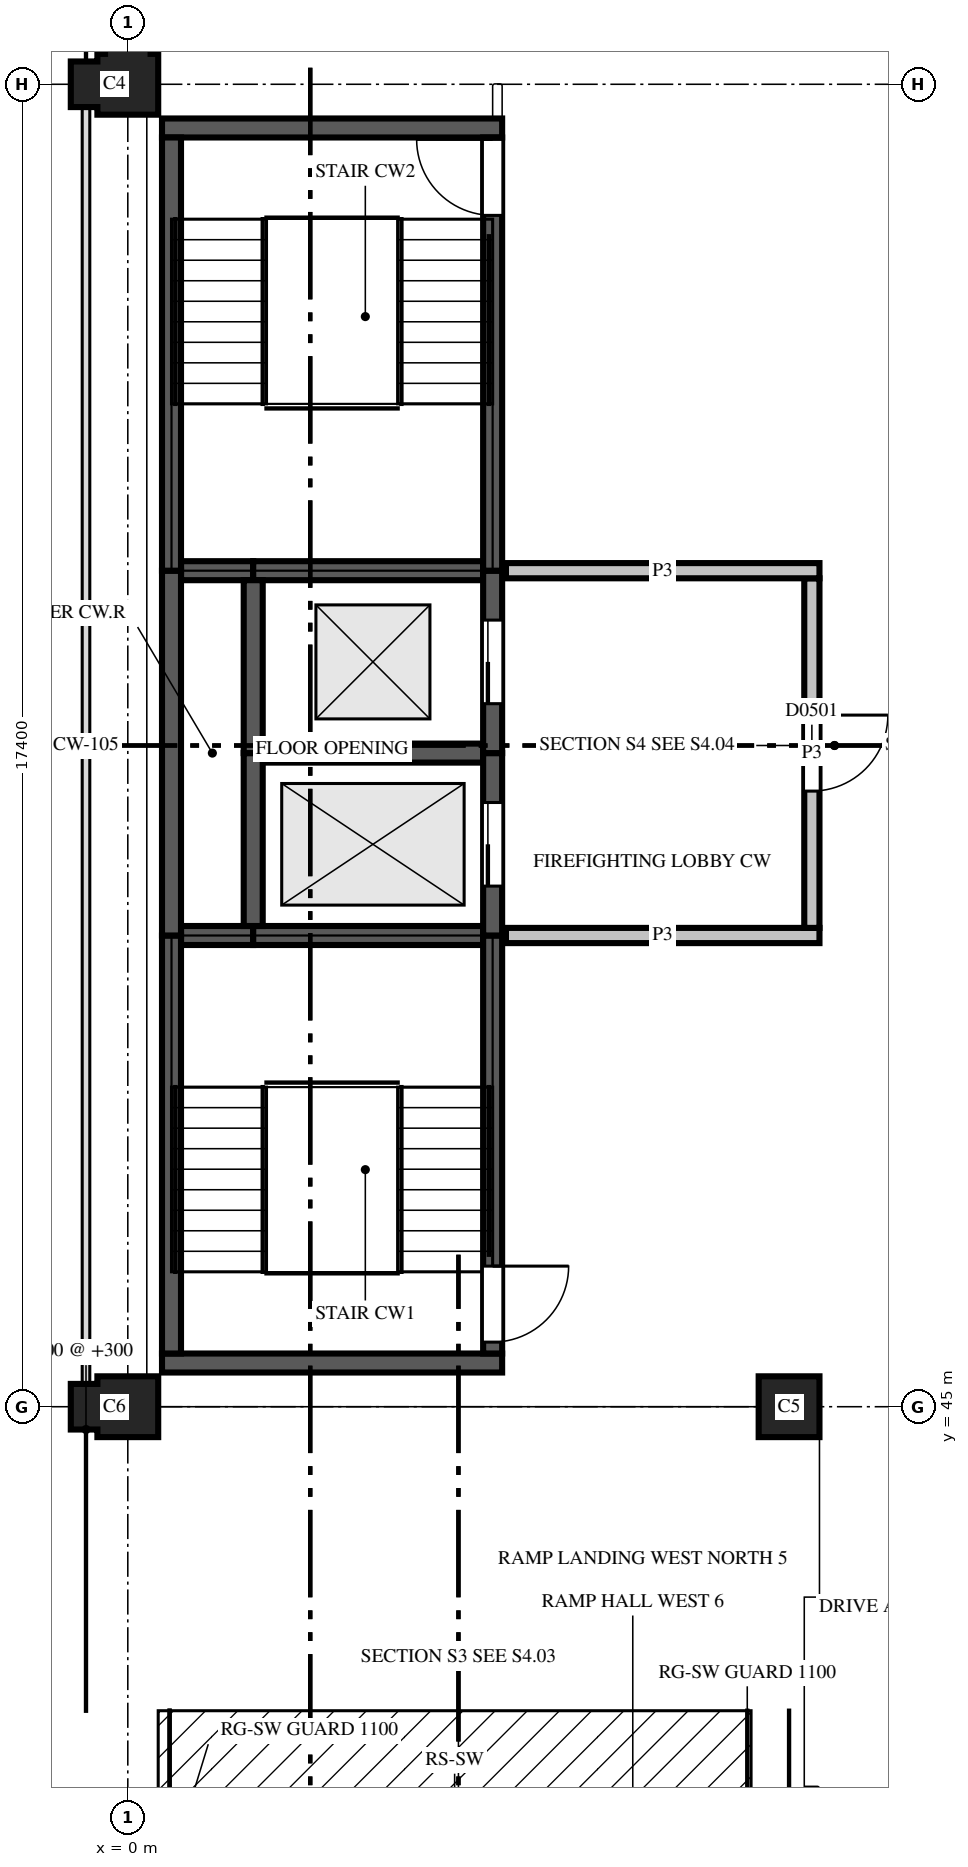
"""IFC4 building model, lengths in metres.
Left out: names, types, materials, properties, quantities, classifications, styles, units other than length and angle.
Written with IfcOpenShell. Run it as: python <this file> out.ifc"""

import sys

from ifc_helpers import new_model, si_unit, direction, frame, frame_2d, origin, place, context, subcontext, project, spatial, polyline, rectangle, outline, extrude, element, fill, save


model = new_model("IFC4")
c1 = context("Model", 3, precision=1e-05, world=origin(), true_north=direction((0.0, 1.0)))
c2 = subcontext(c1, "Body", "Model", "MODEL_VIEW")
j1 = project(units=[si_unit("LENGTHUNIT", "METRE"), si_unit("PLANEANGLEUNIT", "RADIAN")], contexts=[c1])
p1 = place(None, origin())
s1 = spatial("IfcSite", under=j1, at=p1, CompositionType="ELEMENT")
p2 = place(p1, origin())
s2 = spatial("IfcBuilding", under=s1, at=p2, CompositionType="ELEMENT")
p3 = place(p2, frame((0.0, 0.0, 19.3)))
s3 = spatial("IfcBuildingStorey", under=s2, at=p3, CompositionType="ELEMENT", Elevation=19.3)
p4 = place(p3, frame((0.0, 45.0, 0.0), z_axis=(0.0, 0.0, 1.0), x_axis=(-1.0, 0.0, 0.0)))
e1 = element("IfcColumn", 1, at=p4, inside=s3, PredefinedType="COLUMN", context=c2, shape_type="SweptSolid", body=[
    extrude(outline(polyline([(-0.4, -0.4), (0.4, -0.4), (0.4, -0.3), (0.75, -0.3), (0.75, 0.3), (0.4, 0.3), (0.4, 0.4), (-0.4, 0.4), (-0.4, -0.4)])), origin(), (0.0, 0.0, 1.0), 3.7),
])
p5 = place(p3, frame((8.7, 45.0, 0.0), z_axis=(0.0, 0.0, 1.0), x_axis=(1.0, 0.0, 0.0)))
e2 = element("IfcColumn", 2, at=p5, inside=s3, PredefinedType="COLUMN", context=c2, shape_type="SweptSolid", body=[
    extrude(outline(polyline([(-0.4, -0.4), (0.4, -0.4), (0.4, 0.4), (-0.4, 0.4), (-0.4, -0.4)])), origin(), (0.0, 0.0, 1.0), 3.7),
])
p6 = place(p3, frame((0.0, 62.4, 0.0), z_axis=(0.0, 0.0, 1.0), x_axis=(0.0, 1.0, 0.0)))
e3 = element("IfcColumn", 3, at=p6, inside=s3, PredefinedType="COLUMN", context=c2, shape_type="SweptSolid", body=[
    extrude(outline(polyline([(-0.4, -0.4), (0.4, -0.4), (0.4, -0.3), (0.75, -0.3), (0.75, 0.3), (0.4, 0.3), (0.4, 0.4), (0.3, 0.4), (0.3, 0.75), (-0.3, 0.75), (-0.3, 0.4), (-0.4, 0.4), (-0.4, -0.4)])), origin(), (0.0, 0.0, 1.0), 3.7),
])
p7 = place(p3, frame((0.45, 45.575, 0.0), z_axis=(0.0, 0.0, 1.0), x_axis=(1.0, 0.0, 0.0)))
e4 = element("IfcWall", 4, at=p7, inside=s3, PredefinedType="SHEAR", context=c2, shape_type="SweptSolid", body=[
    extrude(rectangle(XDim=4.475, YDim=0.25, at=frame_2d((2.238, 0.0))), origin(), (0.0, 0.0, 1.0), 3.7),
])
p8 = place(p3, frame((0.7, 51.2, 0.0), z_axis=(0.0, 0.0, 1.0), x_axis=(1.0, 0.0, 0.0)))
e5 = element("IfcWall", 5, at=p8, inside=s3, PredefinedType="SHEAR", context=c2, shape_type="SweptSolid", body=[
    extrude(rectangle(XDim=0.95, YDim=0.25, at=frame_2d((0.475, 0.0))), origin(), (0.0, 0.0, 1.0), 3.7),
])
p9 = place(p3, frame((1.65, 51.2, 0.0), z_axis=(0.0, 0.0, 1.0), x_axis=(1.0, 0.0, 0.0)))
e6 = element("IfcWall", 6, at=p9, inside=s3, PredefinedType="SHEAR", context=c2, shape_type="SweptSolid", body=[
    extrude(rectangle(XDim=3.025, YDim=0.25, at=frame_2d((1.513, 0.0))), origin(), (0.0, 0.0, 1.0), 3.7),
])
p10 = place(p3, frame((1.775, 53.6, 0.0), z_axis=(0.0, 0.0, 1.0), x_axis=(1.0, 0.0, 0.0)))
e7 = element("IfcWall", 7, at=p10, inside=s3, PredefinedType="SHEAR", context=c2, shape_type="SweptSolid", body=[
    extrude(rectangle(XDim=2.9, YDim=0.25, at=frame_2d((1.45, 0.0))), origin(), (0.0, 0.0, 1.0), 3.7),
])
p11 = place(p3, frame((0.7, 56.0, 0.0), z_axis=(0.0, 0.0, 1.0), x_axis=(1.0, 0.0, 0.0)))
e8 = element("IfcWall", 8, at=p11, inside=s3, PredefinedType="SHEAR", context=c2, shape_type="SweptSolid", body=[
    extrude(rectangle(XDim=0.95, YDim=0.25, at=frame_2d((0.475, 0.0))), origin(), (0.0, 0.0, 1.0), 3.7),
])
p12 = place(p3, frame((1.65, 56.0, 0.0), z_axis=(0.0, 0.0, 1.0), x_axis=(1.0, 0.0, 0.0)))
e9 = element("IfcWall", 9, at=p12, inside=s3, PredefinedType="SHEAR", context=c2, shape_type="SweptSolid", body=[
    extrude(rectangle(XDim=3.025, YDim=0.25, at=frame_2d((1.513, 0.0))), origin(), (0.0, 0.0, 1.0), 3.7),
])
p13 = place(p3, frame((0.45, 61.825, 0.0), z_axis=(0.0, 0.0, 1.0), x_axis=(1.0, 0.0, 0.0)))
e10 = element("IfcWall", 10, at=p13, inside=s3, PredefinedType="SHEAR", context=c2, shape_type="SweptSolid", body=[
    extrude(rectangle(XDim=4.475, YDim=0.25, at=frame_2d((2.238, 0.0))), origin(), (0.0, 0.0, 1.0), 3.7),
])
p14 = place(p3, frame((0.575, 45.7, 0.0), z_axis=(0.0, 0.0, 1.0), x_axis=(0.0, 1.0, 0.0)))
e11 = element("IfcWall", 11, at=p14, inside=s3, PredefinedType="SHEAR", context=c2, shape_type="SweptSolid", body=[
    extrude(rectangle(XDim=5.5, YDim=0.25, at=frame_2d((2.75, 0.0))), origin(), (0.0, 0.0, 1.0), 3.7),
])
p15 = place(p3, frame((0.575, 51.2, 0.0), z_axis=(0.0, 0.0, 1.0), x_axis=(0.0, 1.0, 0.0)))
e12 = element("IfcWall", 12, at=p15, inside=s3, PredefinedType="SHEAR", context=c2, shape_type="SweptSolid", body=[
    extrude(rectangle(XDim=4.8, YDim=0.25, at=frame_2d((2.4, 0.0))), origin(), (0.0, 0.0, 1.0), 3.7),
])
p16 = place(p3, frame((0.575, 56.0, 0.0), z_axis=(0.0, 0.0, 1.0), x_axis=(0.0, 1.0, 0.0)))
e13 = element("IfcWall", 13, at=p16, inside=s3, PredefinedType="SHEAR", context=c2, shape_type="SweptSolid", body=[
    extrude(rectangle(XDim=5.7, YDim=0.25, at=frame_2d((2.85, 0.0))), origin(), (0.0, 0.0, 1.0), 3.7),
])
p17 = place(p3, frame((1.65, 51.325, 0.0), z_axis=(0.0, 0.0, 1.0), x_axis=(0.0, 1.0, 0.0)))
e14 = element("IfcWall", 14, at=p17, inside=s3, PredefinedType="SHEAR", context=c2, shape_type="SweptSolid", body=[
    extrude(rectangle(XDim=2.275, YDim=0.25, at=frame_2d((1.138, 0.0))), origin(), (0.0, 0.0, 1.0), 3.7),
])
p18 = place(p3, frame((1.65, 53.6, 0.0), z_axis=(0.0, 0.0, 1.0), x_axis=(0.0, 1.0, 0.0)))
e15 = element("IfcWall", 15, at=p18, inside=s3, PredefinedType="SHEAR", context=c2, shape_type="SweptSolid", body=[
    extrude(rectangle(XDim=2.275, YDim=0.25, at=frame_2d((1.137, 0.0))), origin(), (0.0, 0.0, 1.0), 3.7),
])
p19 = place(p3, frame((4.8, 45.7, 0.0), z_axis=(0.0, 0.0, 1.0), x_axis=(0.0, 1.0, 0.0)))
e16 = element("IfcWall", 16, at=p19, inside=s3, PredefinedType="SHEAR", context=c2, shape_type="SweptSolid", body=[
    extrude(rectangle(XDim=5.5, YDim=0.25, at=frame_2d((2.75, 0.0))), origin(), (0.0, 0.0, 1.0), 3.7),
])
p20 = place(p19, frame((0.15, 0.0, 0.0)))
e17 = element("IfcOpeningElement", 17, at=p20, cuts=e16, PredefinedType="OPENING", context=c2, shape_type="SweptSolid", body=[
    extrude(rectangle(XDim=1.0, YDim=2.1, at=frame_2d((0.5, 1.05))), frame((0.0, 0.135, 0.0), z_axis=(0.0, -1.0, 0.0), x_axis=(1.0, 0.0, 0.0)), (0.0, 0.0, 1.0), 0.27),
])
p21 = place(p3, frame((4.8, 51.2, 0.0), z_axis=(0.0, 0.0, 1.0), x_axis=(0.0, 1.0, 0.0)))
e18 = element("IfcWall", 18, at=p21, inside=s3, PredefinedType="SHEAR", context=c2, shape_type="SweptSolid", body=[
    extrude(rectangle(XDim=2.4, YDim=0.25, at=frame_2d((1.2, 0.0))), origin(), (0.0, 0.0, 1.0), 3.7),
])
p22 = place(p21, frame((0.65, 0.0, 0.0)))
e19 = element("IfcOpeningElement", 19, at=p22, cuts=e18, PredefinedType="OPENING", context=c2, shape_type="SweptSolid", body=[
    extrude(rectangle(XDim=1.1, YDim=2.1, at=frame_2d((0.55, 1.05))), frame((0.0, 0.135, 0.0), z_axis=(0.0, -1.0, 0.0), x_axis=(1.0, 0.0, 0.0)), (0.0, 0.0, 1.0), 0.27),
])
p23 = place(p3, frame((4.8, 53.6, 0.0), z_axis=(0.0, 0.0, 1.0), x_axis=(0.0, 1.0, 0.0)))
e20 = element("IfcWall", 20, at=p23, inside=s3, PredefinedType="SHEAR", context=c2, shape_type="SweptSolid", body=[
    extrude(rectangle(XDim=2.4, YDim=0.25, at=frame_2d((1.2, 0.0))), origin(), (0.0, 0.0, 1.0), 3.7),
])
p24 = place(p23, frame((0.65, 0.0, 0.0)))
e21 = element("IfcOpeningElement", 21, at=p24, cuts=e20, PredefinedType="OPENING", context=c2, shape_type="SweptSolid", body=[
    extrude(rectangle(XDim=1.1, YDim=2.1, at=frame_2d((0.55, 1.05))), frame((0.0, 0.135, 0.0), z_axis=(0.0, -1.0, 0.0), x_axis=(1.0, 0.0, 0.0)), (0.0, 0.0, 1.0), 0.27),
])
p25 = place(p3, frame((4.8, 56.0, 0.0), z_axis=(0.0, 0.0, 1.0), x_axis=(0.0, 1.0, 0.0)))
e22 = element("IfcWall", 22, at=p25, inside=s3, PredefinedType="SHEAR", context=c2, shape_type="SweptSolid", body=[
    extrude(rectangle(XDim=5.7, YDim=0.25, at=frame_2d((2.85, 0.0))), origin(), (0.0, 0.0, 1.0), 3.7),
])
p26 = place(p25, frame((4.675, 0.0, 0.0)))
e23 = element("IfcOpeningElement", 23, at=p26, cuts=e22, PredefinedType="OPENING", context=c2, shape_type="SweptSolid", body=[
    extrude(rectangle(XDim=1.0, YDim=2.1, at=frame_2d((0.5, 1.05))), frame((0.0, 0.135, 0.0), z_axis=(0.0, -1.0, 0.0), x_axis=(1.0, 0.0, 0.0)), (0.0, 0.0, 1.0), 0.27),
])
p27 = place(p3, frame((4.975, 51.2, 0.0), z_axis=(0.0, 0.0, 1.0), x_axis=(1.0, 0.0, 0.0)))
e24 = element("IfcWall", 24, at=p27, inside=s3, PredefinedType="PARTITIONING", context=c2, shape_type="SweptSolid", body=[
    extrude(rectangle(XDim=4.125, YDim=0.2, at=frame_2d((2.062, 0.0))), origin(), (0.0, 0.0, 1.0), 2.88),
])
p28 = place(p3, frame((9.0, 51.3, 0.0), z_axis=(0.0, 0.0, 1.0), x_axis=(0.0, 1.0, 0.0)))
e25 = element("IfcWall", 25, at=p28, inside=s3, PredefinedType="PARTITIONING", context=c2, shape_type="SweptSolid", body=[
    extrude(rectangle(XDim=4.6, YDim=0.2, at=frame_2d((2.3, 0.0))), origin(), (0.0, 0.0, 1.0), 2.88),
])
p29 = place(p28, frame((1.8, 0.0, 0.0)))
e26 = element("IfcOpeningElement", 26, at=p29, cuts=e25, PredefinedType="OPENING", context=c2, shape_type="SweptSolid", body=[
    extrude(rectangle(XDim=1.0, YDim=2.1, at=frame_2d((0.5, 1.05))), frame((0.0, 0.11, 0.0), z_axis=(0.0, -1.0, 0.0), x_axis=(1.0, 0.0, 0.0)), (0.0, 0.0, 1.0), 0.22),
])
p30 = place(p3, frame((9.1, 56.0, 0.0), z_axis=(0.0, 0.0, 1.0), x_axis=(-1.0, 0.0, 0.0)))
e27 = element("IfcWall", 27, at=p30, inside=s3, PredefinedType="PARTITIONING", context=c2, shape_type="SweptSolid", body=[
    extrude(rectangle(XDim=4.125, YDim=0.2, at=frame_2d((2.062, 0.0))), origin(), (0.0, 0.0, 1.0), 2.88),
])
p31 = place(p29, origin())
e28 = element("IfcDoor", 28, at=p31, inside=s3, OperationType="SINGLE_SWING_RIGHT", PredefinedType="DOOR", context=c2, shape_type="SweptSolid", body=[
    extrude(rectangle(XDim=1.0, YDim=2.1, at=frame_2d((0.5, 1.05))), frame((0.0, 0.025, 0.0), z_axis=(0.0, -1.0, 0.0), x_axis=(1.0, 0.0, 0.0)), (0.0, 0.0, 1.0), 0.05),
])
fill(e26, e28)
p32 = place(p22, origin())
e29 = element("IfcDoor", 29, at=p32, inside=s3, OperationType="SLIDING_TO_LEFT", PredefinedType="DOOR", context=c2, shape_type="SweptSolid", body=[
    extrude(rectangle(XDim=1.1, YDim=2.1, at=frame_2d((0.55, 1.05))), frame((0.0, 0.025, 0.0), z_axis=(0.0, -1.0, 0.0), x_axis=(1.0, 0.0, 0.0)), (0.0, 0.0, 1.0), 0.05),
])
fill(e19, e29)
p33 = place(p24, origin())
e30 = element("IfcDoor", 30, at=p33, inside=s3, OperationType="SLIDING_TO_LEFT", PredefinedType="DOOR", context=c2, shape_type="SweptSolid", body=[
    extrude(rectangle(XDim=1.1, YDim=2.1, at=frame_2d((0.55, 1.05))), frame((0.0, 0.025, 0.0), z_axis=(0.0, -1.0, 0.0), x_axis=(1.0, 0.0, 0.0)), (0.0, 0.0, 1.0), 0.05),
])
fill(e21, e30)
p34 = place(p26, origin())
e31 = element("IfcDoor", 31, at=p34, inside=s3, OperationType="SINGLE_SWING_LEFT", PredefinedType="DOOR", context=c2, shape_type="SweptSolid", body=[
    extrude(rectangle(XDim=1.0, YDim=2.1, at=frame_2d((0.5, 1.05))), frame((0.0, 0.025, 0.0), z_axis=(0.0, -1.0, 0.0), x_axis=(1.0, 0.0, 0.0)), (0.0, 0.0, 1.0), 0.05),
])
fill(e23, e31)
p35 = place(p20, origin())
e32 = element("IfcDoor", 32, at=p35, inside=s3, OperationType="SINGLE_SWING_RIGHT", PredefinedType="DOOR", context=c2, shape_type="SweptSolid", body=[
    extrude(rectangle(XDim=1.0, YDim=2.1, at=frame_2d((0.5, 1.05))), frame((0.0, 0.025, 0.0), z_axis=(0.0, -1.0, 0.0), x_axis=(1.0, 0.0, 0.0)), (0.0, 0.0, 1.0), 0.05),
])
fill(e17, e32)
save(model, sys.argv[1])
